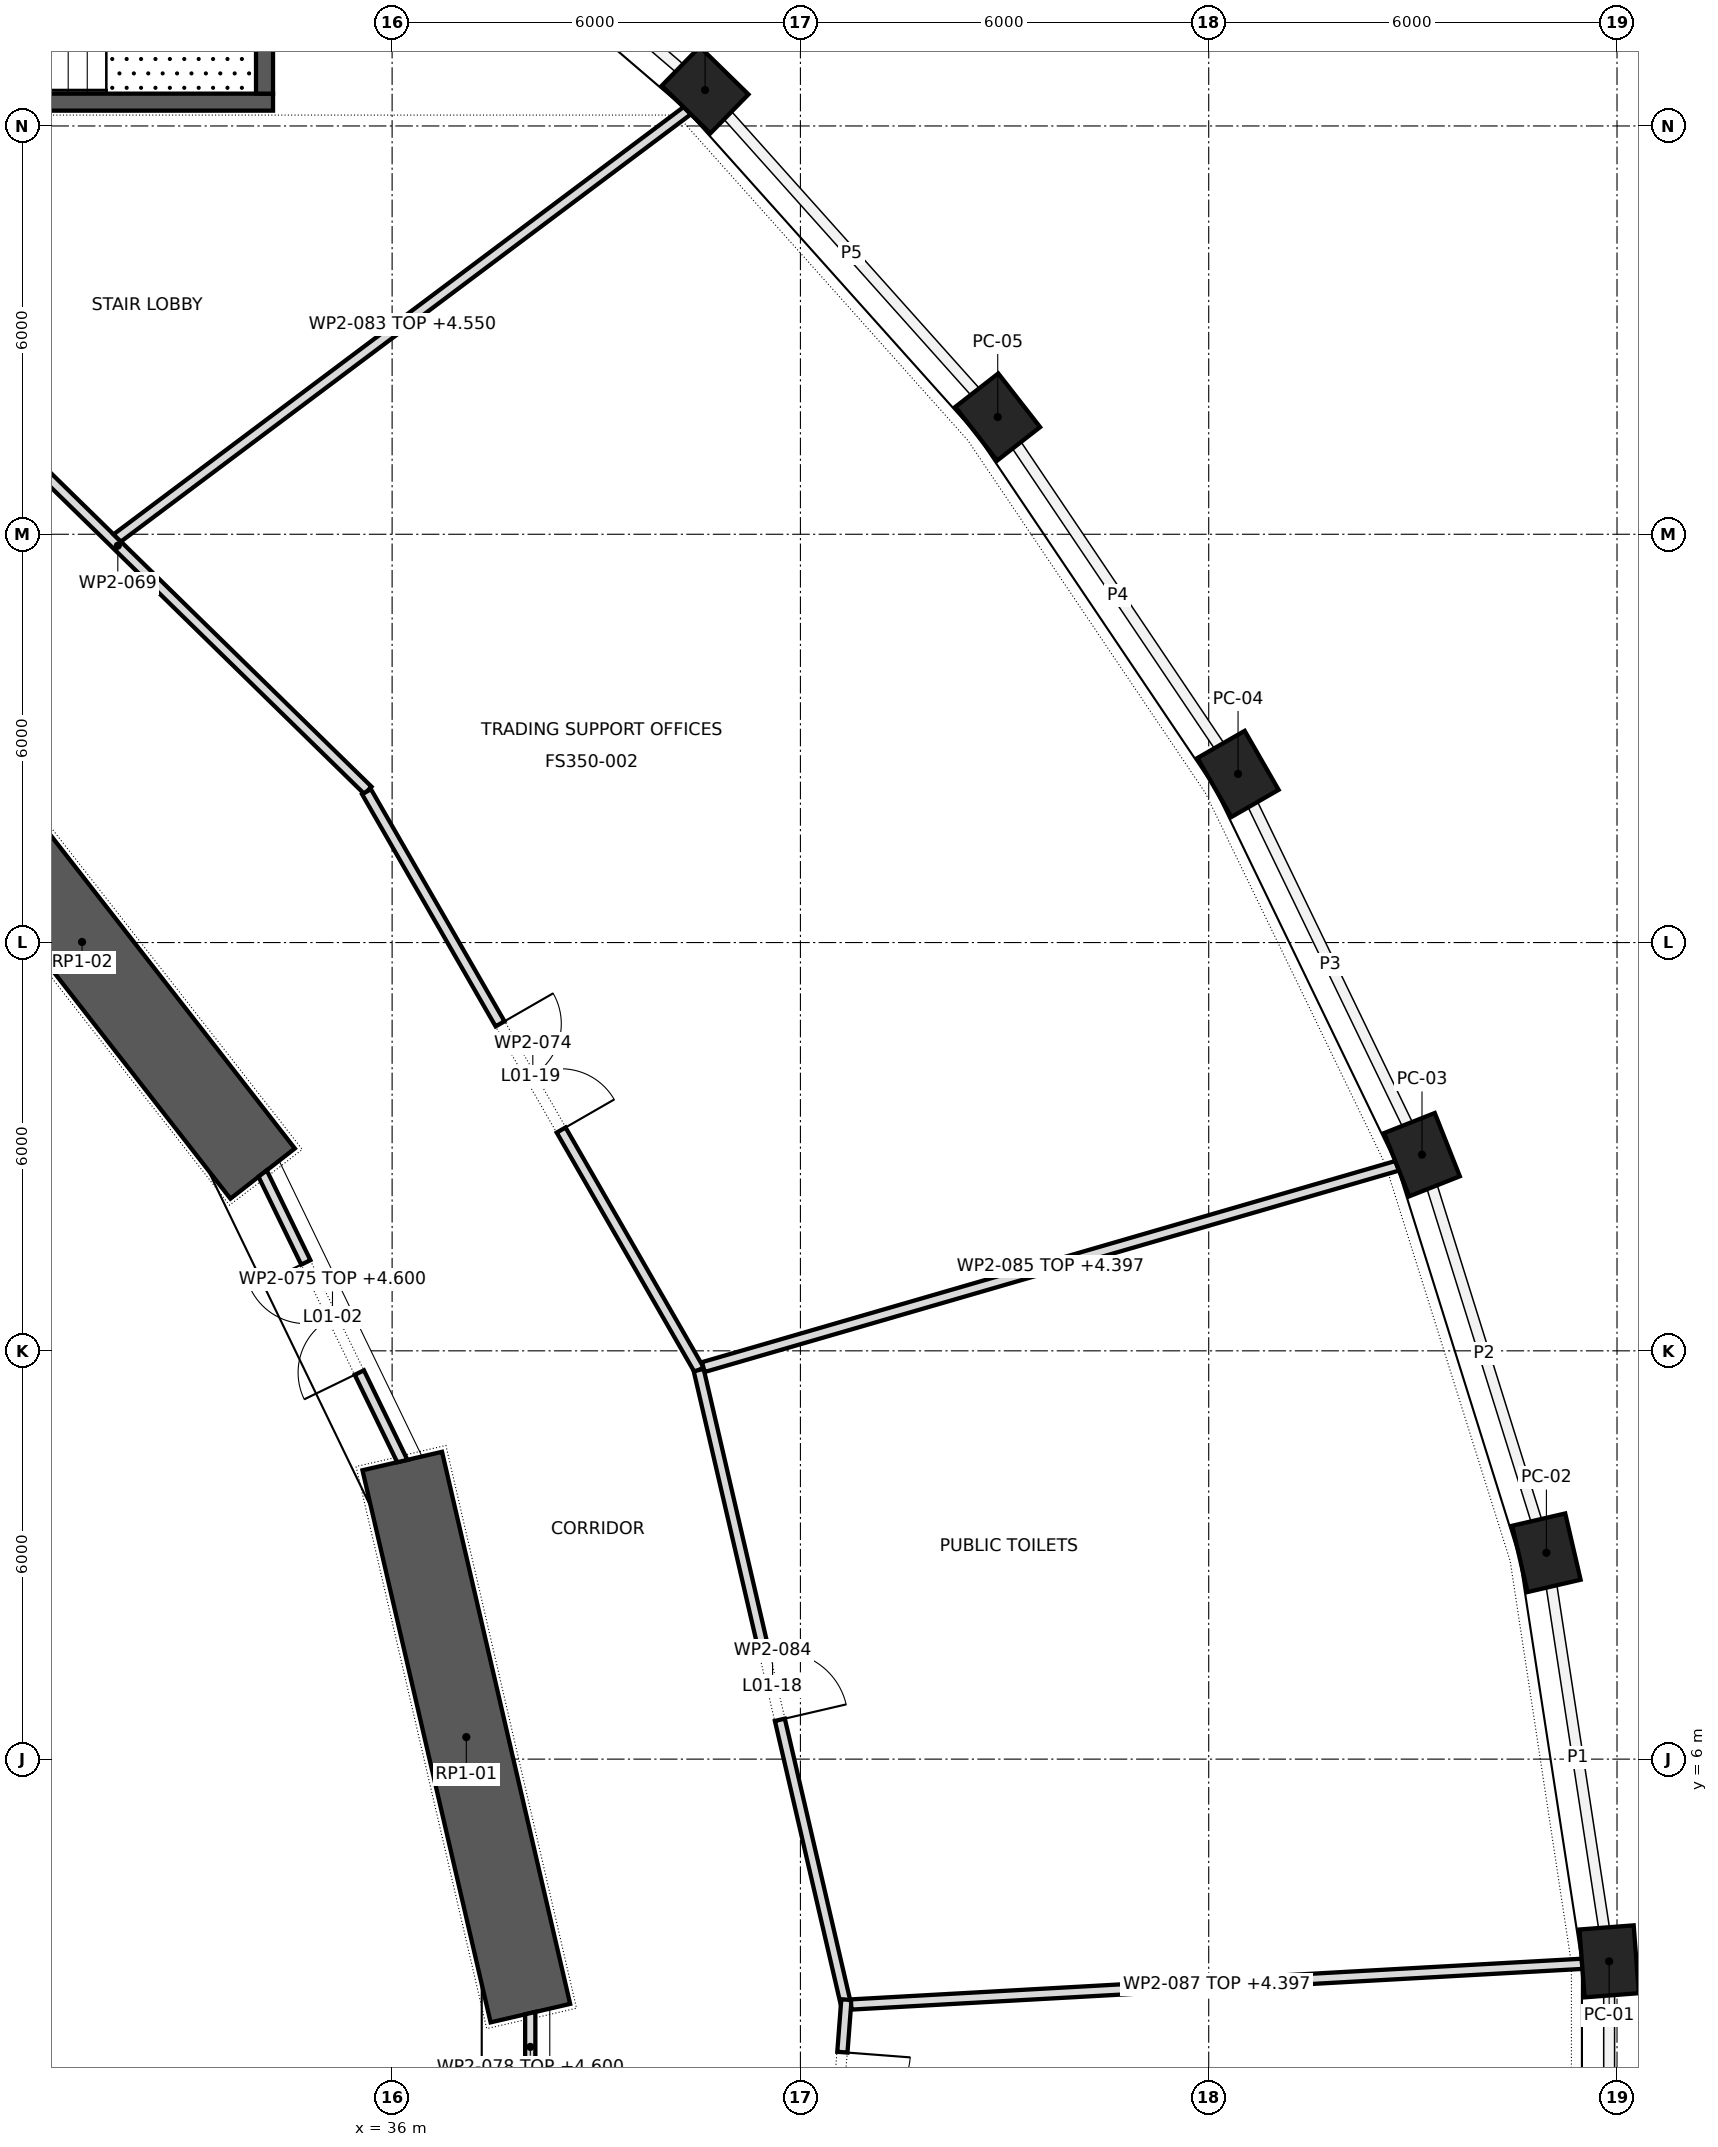
"""IFC4 building model, lengths in metres.
Left out: names, types, materials, properties, quantities, classifications, styles, units other than length and angle.
Written with IfcOpenShell. Run it as: python <this file> out.ifc"""

import sys

from ifc_helpers import new_model, si_unit, direction, frame, frame_2d, origin, origin_2d, place, context, subcontext, project, spatial, polyline, rectangle, outline, extrude, element, fill, save


model = new_model("IFC4")
c1 = context("Model", 3, precision=1e-05, world=origin(), true_north=direction((0.0, 1.0)))
c2 = subcontext(c1, "Body", "Model", "MODEL_VIEW")
j1 = project(units=[si_unit("LENGTHUNIT", "METRE"), si_unit("PLANEANGLEUNIT", "RADIAN")], contexts=[c1])
p1 = place(None, origin())
s1 = spatial("IfcSite", under=j1, at=p1, CompositionType="ELEMENT")
p2 = place(p1, origin())
s2 = spatial("IfcBuilding", under=s1, at=p2, CompositionType="ELEMENT")
p3 = place(p2, frame((0.0, 0.0, 7.0)))
s3 = spatial("IfcBuildingStorey", under=s2, at=p3, CompositionType="ELEMENT", Elevation=7.0)
for number, where, z_axis, x_axis in (
    (1, (53.885, 3.028, 0.0), (0.0, 0.0, 1.0), (-0.076, 0.997, 0.0)),
    (2, (52.962, 9.033, 0.0), (0.0, 0.0, 1.0), (-0.226, 0.974, 0.0)),
    (3, (51.134, 14.883, 0.0), (0.0, 0.0, 1.0), (-0.368, 0.93, 0.0)),
    (4, (48.431, 20.478, 0.0), (0.0, 0.0, 1.0), (-0.499, 0.867, 0.0)),
    (5, (44.899, 25.723, 0.0), (0.0, 0.0, 1.0), (-0.615, 0.789, 0.0)),
    (6, (40.599, 30.528, 0.0), (0.0, 0.0, 1.0), (-0.715, 0.699, 0.0)),
):
    element("IfcColumn", number, at=place(p3, frame(where, z_axis=z_axis, x_axis=x_axis)), inside=s3, PredefinedType="COLUMN", context=c2, shape_type="SweptSolid", body=[
        extrude(rectangle(XDim=1.0, YDim=0.8, at=origin_2d()), origin(), (0.0, 0.0, 1.0), 5.5),
    ])
p4 = place(p3, frame((38.032, 2.267, 0.0), z_axis=(0.0, 0.0, 1.0), x_axis=(-0.226058185805, 0.974113800657, 0.0)))
e7 = element("IfcWall", 7, at=p4, inside=s3, PredefinedType="SHEAR", context=c2, shape_type="SweptSolid", body=[
    extrude(rectangle(XDim=8.329, YDim=1.2, at=frame_2d((4.165, 0.0))), origin(), (0.0, 0.0, 1.0), 5.5),
])
p5 = place(p3, frame((34.097, 14.605, 0.0), z_axis=(0.0, 0.0, 1.0), x_axis=(-0.614825322247, 0.788663314174, 0.0)))
e8 = element("IfcWall", 8, at=p5, inside=s3, PredefinedType="SHEAR", context=c2, shape_type="SweptSolid", body=[
    extrude(rectangle(XDim=8.632, YDim=1.2, at=frame_2d((4.316, 0.0))), origin(), (0.0, 0.0, 1.0), 5.5),
])
p6 = place(p3, frame((25.75, 30.35, 0.0), z_axis=(0.0, 0.0, 1.0), x_axis=(1.0, 0.0, 0.0)))
e9 = element("IfcWall", 9, at=p6, inside=s3, PredefinedType="SHEAR", context=c2, shape_type="SweptSolid", body=[
    extrude(rectangle(XDim=8.5, YDim=0.25, at=frame_2d((4.25, 0.0))), origin(), (0.0, 0.0, 1.0), 5.15),
])
p7 = place(p3, frame((34.125, 30.475, 0.0), z_axis=(0.0, 0.0, 1.0), x_axis=(0.0, 1.0, 0.0)))
e10 = element("IfcWall", 10, at=p7, inside=s3, PredefinedType="SHEAR", context=c2, shape_type="SweptSolid", body=[
    extrude(rectangle(XDim=3.05, YDim=0.25, at=frame_2d((1.525, 0.0))), origin(), (0.0, 0.0, 1.0), 5.15),
])
p8 = place(p3, frame((28.294, 27.428, 0.0), z_axis=(0.0, 0.0, 1.0), x_axis=(0.71483918539, -0.699288880958, 0.0)))
e11 = element("IfcWall", 11, at=p8, inside=s3, PredefinedType="PARTITIONING", context=c2, shape_type="SweptSolid", body=[
    extrude(rectangle(XDim=10.283, YDim=0.15, at=frame_2d((5.142, 0.0))), origin(), (0.0, 0.0, 1.0), 5.15),
])
p9 = place(p3, frame((35.624, 20.216, 0.0), z_axis=(0.0, 0.0, 1.0), x_axis=(0.498658302921, -0.866798648434, 0.0)))
e12 = element("IfcWall", 12, at=p9, inside=s3, PredefinedType="PARTITIONING", context=c2, shape_type="SweptSolid", body=[
    extrude(rectangle(XDim=9.802, YDim=0.15, at=frame_2d((4.901, 0.0))), origin(), (0.0, 0.0, 1.0), 5.15),
])
p10 = place(p9, frame((3.935, 0.0, 0.0)))
e13 = element("IfcOpeningElement", 13, at=p10, cuts=e12, PredefinedType="OPENING", context=c2, shape_type="SweptSolid", body=[
    extrude(rectangle(XDim=1.8, YDim=2.1, at=frame_2d((0.9, 1.05))), frame((0.0, 0.087, 0.0), z_axis=(0.0, -1.0, 0.0), x_axis=(1.0, 0.0, 0.0)), (0.0, 0.0, 1.0), 0.174),
])
p11 = place(p3, frame((36.15, 10.38, 0.0), z_axis=(0.0, 0.0, 1.0), x_axis=(-0.436936398764, 0.899492403212, 0.0)))
e14 = element("IfcWall", 14, at=p11, inside=s3, PredefinedType="PARTITIONING", context=c2, shape_type="SweptSolid", body=[
    extrude(outline(polyline([(-0.017, -0.075), (4.714, -0.075), (4.682, 0.075), (0.017, 0.075), (-0.017, -0.075)])), origin(), (0.0, 0.0, 1.0), 4.6),
])
p12 = place(p11, frame((1.446, 0.0, 0.0)))
e15 = element("IfcOpeningElement", 15, at=p12, cuts=e14, PredefinedType="OPENING", context=c2, shape_type="SweptSolid", body=[
    extrude(rectangle(XDim=1.8, YDim=2.1, at=frame_2d((0.9, 1.05))), frame((0.0, 0.087, 0.0), z_axis=(0.0, -1.0, 0.0), x_axis=(1.0, 0.0, 0.0)), (0.0, 0.0, 1.0), 0.174),
])
p13 = place(p3, frame((38.03, 1.275, 0.0), z_axis=(0.0, 0.0, 1.0), x_axis=(0.0, 1.0, 0.0)))
e16 = element("IfcWall", 16, at=p13, inside=s3, PredefinedType="PARTITIONING", context=c2, shape_type="SweptSolid", body=[
    extrude(outline(polyline([(0.0, -0.075), (1.01, -0.075), (0.975, 0.075), (0.0, 0.075), (0.0, -0.075)])), origin(), (0.0, 0.0, 1.0), 4.6),
])
p14 = place(p3, frame((40.337, 30.226, 0.0), z_axis=(0.0, 0.0, 1.0), x_axis=(-0.800117504973, -0.599843294732, 0.0)))
e17 = element("IfcWall", 17, at=p14, inside=s3, PredefinedType="PARTITIONING", context=c2, shape_type="SweptSolid", body=[
    extrude(outline(polyline([(0.011, -0.075), (10.482, -0.075), (10.459, 0.075), (-0.011, 0.075), (0.011, -0.075)])), origin(), (0.0, 0.0, 1.0), 4.55),
])
p15 = place(p3, frame((40.505, 11.717, 0.0), z_axis=(0.0, 0.0, 1.0), x_axis=(0.226066375297, -0.974111900122, 0.0)))
e18 = element("IfcWall", 18, at=p15, inside=s3, PredefinedType="PARTITIONING", context=c2, shape_type="SweptSolid", body=[
    extrude(rectangle(XDim=9.602, YDim=0.15, at=frame_2d((4.801, 0.0))), origin(), (0.0, 0.0, 1.0), 5.15),
])
p16 = place(p15, frame((4.276, 0.0, 0.0)))
e19 = element("IfcOpeningElement", 19, at=p16, cuts=e18, PredefinedType="OPENING", context=c2, shape_type="SweptSolid", body=[
    extrude(rectangle(XDim=1.0, YDim=2.1, at=frame_2d((0.5, 1.05))), frame((0.0, 0.087, 0.0), z_axis=(0.0, -1.0, 0.0), x_axis=(1.0, 0.0, 0.0)), (0.0, 0.0, 1.0), 0.174),
])
p17 = place(p3, frame((40.573, 11.761, 0.0), z_axis=(0.0, 0.0, 1.0), x_axis=(0.960398251087, 0.278630937459, 0.0)))
e20 = element("IfcWall", 20, at=p17, inside=s3, PredefinedType="PARTITIONING", context=c2, shape_type="SweptSolid", body=[
    extrude(outline(polyline([(0.0, -0.075), (10.623, -0.075), (10.609, 0.075), (0.0, 0.075), (0.0, -0.075)])), origin(), (0.0, 0.0, 1.0), 4.397),
])
p18 = place(p3, frame((41.948, -7.019, 0.0), z_axis=(0.0, 0.0, 1.0), x_axis=(0.076460967433, 0.997072575322, 0.0)))
e21 = element("IfcWall", 21, at=p18, inside=s3, PredefinedType="PARTITIONING", context=c2, shape_type="SweptSolid", body=[
    extrude(rectangle(XDim=9.512, YDim=0.15, at=frame_2d((4.756, 0.0))), origin(), (0.0, 0.0, 1.0), 5.15),
])
p19 = place(p18, frame((7.738, 0.0, 0.0)))
e22 = element("IfcOpeningElement", 22, at=p19, cuts=e21, PredefinedType="OPENING", context=c2, shape_type="SweptSolid", body=[
    extrude(rectangle(XDim=1.0, YDim=2.1, at=frame_2d((0.5, 1.05))), frame((0.0, 0.087, 0.0), z_axis=(0.0, -1.0, 0.0), x_axis=(1.0, 0.0, 0.0)), (0.0, 0.0, 1.0), 0.174),
])
p20 = place(p3, frame((53.487, 2.992, 0.0), z_axis=(0.0, 0.0, 1.0), x_axis=(-0.998455601215, -0.055555489403, 0.0)))
e23 = element("IfcWall", 23, at=p20, inside=s3, PredefinedType="PARTITIONING", context=c2, shape_type="SweptSolid", body=[
    extrude(outline(polyline([(0.001, -0.075), (10.758, -0.075), (10.758, 0.075), (-0.001, 0.075), (0.001, -0.075)])), origin(), (0.0, 0.0, 1.0), 4.397),
])
p21 = place(p12, origin())
e24 = element("IfcDoor", 24, at=p21, inside=s3, OperationType="DOUBLE_DOOR_SINGLE_SWING", PredefinedType="DOOR", context=c2, shape_type="SweptSolid", body=[
    extrude(rectangle(XDim=1.8, YDim=2.1, at=frame_2d((0.9, 1.05))), frame((0.0, 0.025, 0.0), z_axis=(0.0, -1.0, 0.0), x_axis=(1.0, 0.0, 0.0)), (0.0, 0.0, 1.0), 0.05),
])
fill(e15, e24)
p22 = place(p16, origin())
e25 = element("IfcDoor", 25, at=p22, inside=s3, OperationType="SINGLE_SWING_LEFT", PredefinedType="DOOR", context=c2, shape_type="SweptSolid", body=[
    extrude(rectangle(XDim=1.0, YDim=2.1, at=frame_2d((0.5, 1.05))), frame((0.0, 0.025, 0.0), z_axis=(0.0, -1.0, 0.0), x_axis=(1.0, 0.0, 0.0)), (0.0, 0.0, 1.0), 0.05),
])
fill(e19, e25)
p23 = place(p10, origin())
e26 = element("IfcDoor", 26, at=p23, inside=s3, OperationType="DOUBLE_DOOR_SINGLE_SWING", PredefinedType="DOOR", context=c2, shape_type="SweptSolid", body=[
    extrude(rectangle(XDim=1.8, YDim=2.1, at=frame_2d((0.9, 1.05))), frame((0.0, 0.025, 0.0), z_axis=(0.0, -1.0, 0.0), x_axis=(1.0, 0.0, 0.0)), (0.0, 0.0, 1.0), 0.05),
])
fill(e13, e26)
p24 = place(p19, frame((1.0, 0.0, 0.0), z_axis=(0.0, 0.0, 1.0), x_axis=(-1.0, 0.0, 0.0)))
e27 = element("IfcDoor", 27, at=p24, inside=s3, OperationType="SINGLE_SWING_RIGHT", PredefinedType="DOOR", context=c2, shape_type="SweptSolid", body=[
    extrude(rectangle(XDim=1.0, YDim=2.1, at=frame_2d((0.5, 1.05))), frame((0.0, 0.025, 0.0), z_axis=(0.0, -1.0, 0.0), x_axis=(1.0, 0.0, 0.0)), (0.0, 0.0, 1.0), 0.05),
])
fill(e22, e27)
save(model, sys.argv[1])
